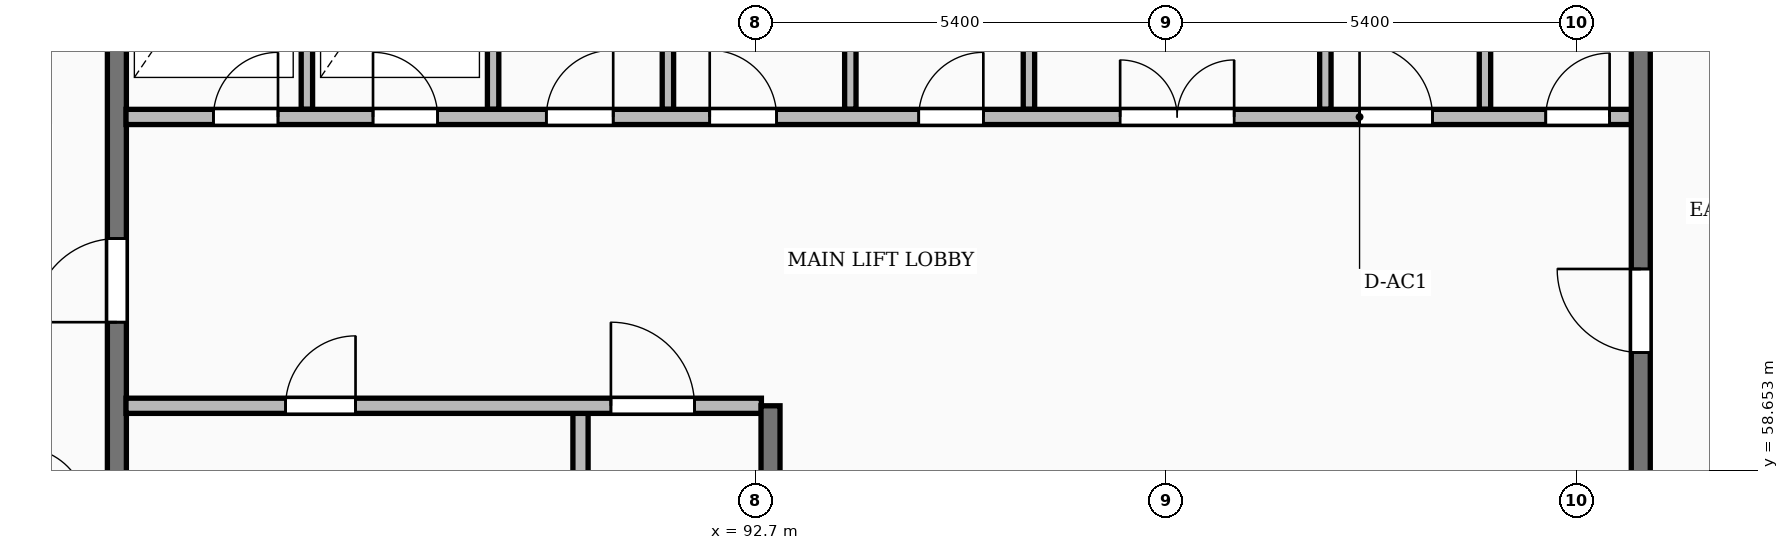
"""IFC4 building model, lengths in metres.
Left out: names, types, materials, properties, quantities, classifications, styles, units other than length and angle.
Written with IfcOpenShell. Run it as: python <this file> out.ifc"""

import sys

from ifc_helpers import new_model, si_unit, direction, frame, frame_2d, origin, place, context, subcontext, project, spatial, rectangle, extrude, element, fill, save


model = new_model("IFC4")
c1 = context("Model", 3, precision=1e-05, world=origin(), true_north=direction((0.0, 1.0)))
c2 = subcontext(c1, "Body", "Model", "MODEL_VIEW")
j1 = project(units=[si_unit("LENGTHUNIT", "METRE"), si_unit("PLANEANGLEUNIT", "RADIAN")], contexts=[c1])
p1 = place(None, origin())
s1 = spatial("IfcSite", under=j1, at=p1, CompositionType="ELEMENT")
p2 = place(p1, origin())
s2 = spatial("IfcBuilding", under=s1, at=p2, CompositionType="ELEMENT")
p3 = place(p2, frame((0.0, 0.0, 139.3)))
s3 = spatial("IfcBuildingStorey", under=s2, at=p3, CompositionType="ELEMENT", Elevation=139.3)
p4 = place(p3, frame((84.3, 55.4, 0.0), z_axis=(0.0, 0.0, 1.0), x_axis=(0.0, 1.0, 0.0)))
e1 = element("IfcWall", 1, at=p4, inside=s3, PredefinedType="SHEAR", context=c2, shape_type="SweptSolid", body=[
    extrude(rectangle(XDim=11.6, YDim=0.25, at=frame_2d((5.8, 0.0))), origin(), (0.0, 0.0, 1.0), 3.6),
])
p5 = place(p4, frame((5.2, 0.0, 0.0)))
e2 = element("IfcOpeningElement", 2, at=p5, cuts=e1, PredefinedType="OPENING", context=c2, shape_type="SweptSolid", body=[
    extrude(rectangle(XDim=1.1, YDim=2.1, at=frame_2d((0.55, 1.05))), frame((0.0, 0.135, 0.0), z_axis=(0.0, -1.0, 0.0), x_axis=(1.0, 0.0, 0.0)), (0.0, 0.0, 1.0), 0.27),
])
p6 = place(p3, frame((90.4, 55.4, 0.0), z_axis=(0.0, 0.0, 1.0), x_axis=(0.0, 1.0, 0.0)))
e3 = element("IfcWall", 3, at=p6, inside=s3, PredefinedType="PARTITIONING", context=c2, shape_type="SweptSolid", body=[
    extrude(rectangle(XDim=4.1, YDim=0.2, at=frame_2d((2.05, 0.0))), origin(), (0.0, 0.0, 1.0), 3.31),
])
p7 = place(p3, frame((84.42, 59.5, 0.0), z_axis=(0.0, 0.0, 1.0), x_axis=(1.0, 0.0, 0.0)))
e4 = element("IfcWall", 4, at=p7, inside=s3, PredefinedType="PARTITIONING", context=c2, shape_type="SweptSolid", body=[
    extrude(rectangle(XDim=8.36, YDim=0.2, at=frame_2d((4.18, 0.0))), origin(), (0.0, 0.0, 1.0), 3.31),
])
p8 = place(p7, frame((2.1, 0.0, 0.0)))
e5 = element("IfcOpeningElement", 5, at=p8, cuts=e4, PredefinedType="OPENING", context=c2, shape_type="SweptSolid", body=[
    extrude(rectangle(XDim=0.92, YDim=2.08, at=frame_2d((0.46, 1.04))), frame((0.0, 0.11, 0.0), z_axis=(0.0, -1.0, 0.0), x_axis=(1.0, 0.0, 0.0)), (0.0, 0.0, 1.0), 0.22),
])
p9 = place(p7, frame((6.38, 0.0, 0.0)))
e6 = element("IfcOpeningElement", 6, at=p9, cuts=e4, PredefinedType="OPENING", context=c2, shape_type="SweptSolid", body=[
    extrude(rectangle(XDim=1.1, YDim=2.1, at=frame_2d((0.55, 1.05))), frame((0.0, 0.11, 0.0), z_axis=(0.0, -1.0, 0.0), x_axis=(1.0, 0.0, 0.0)), (0.0, 0.0, 1.0), 0.22),
])
p10 = place(p3, frame((92.9, 55.4, 0.0), z_axis=(0.0, 0.0, 1.0), x_axis=(0.0, 1.0, 0.0)))
e7 = element("IfcWall", 7, at=p10, inside=s3, PredefinedType="SHEAR", context=c2, shape_type="SweptSolid", body=[
    extrude(rectangle(XDim=4.1, YDim=0.25, at=frame_2d((2.05, 0.0))), origin(), (0.0, 0.0, 1.0), 3.6),
])
for number, where, z_axis, x_axis in (
    (8, (86.8, 63.4, 0.0), (0.0, 0.0, 1.0), (0.0, 1.0, 0.0)),
    (9, (89.25, 63.4, 0.0), (0.0, 0.0, 1.0), (0.0, 1.0, 0.0)),
    (10, (91.55, 63.4, 0.0), (0.0, 0.0, 1.0), (0.0, 1.0, 0.0)),
):
    element("IfcWall", number, at=place(p3, frame(where, z_axis=z_axis, x_axis=x_axis)), inside=s3, PredefinedType="PARTITIONING", context=c2, shape_type="SweptSolid", body=[
        extrude(rectangle(XDim=3.6, YDim=0.15, at=frame_2d((1.8, 0.0))), origin(), (0.0, 0.0, 1.0), 3.31),
    ])
p11 = place(p3, frame((93.95, 63.4, 0.0), z_axis=(0.0, 0.0, 1.0), x_axis=(0.0, 1.0, 0.0)))
e11 = element("IfcWall", 11, at=p11, inside=s3, PredefinedType="PARTITIONING", context=c2, shape_type="SweptSolid", body=[
    extrude(rectangle(XDim=3.6, YDim=0.15, at=frame_2d((1.8, 0.0))), origin(), (0.0, 0.0, 1.0), 2.617),
])
for number, where, z_axis, x_axis in (
    (12, (102.3, 63.4, 0.0), (0.0, 0.0, 1.0), (0.0, 1.0, 0.0)),
    (13, (96.3, 63.4, 0.0), (0.0, 0.0, 1.0), (0.0, 1.0, 0.0)),
    (14, (100.2, 63.4, 0.0), (0.0, 0.0, 1.0), (0.0, 1.0, 0.0)),
):
    element("IfcWall", number, at=place(p3, frame(where, z_axis=z_axis, x_axis=x_axis)), inside=s3, PredefinedType="PARTITIONING", context=c2, shape_type="SweptSolid", body=[
        extrude(rectangle(XDim=3.6, YDim=0.15, at=frame_2d((1.8, 0.0))), origin(), (0.0, 0.0, 1.0), 3.31),
    ])
p12 = place(p3, frame((84.42, 63.3, 0.0), z_axis=(0.0, 0.0, 1.0), x_axis=(1.0, 0.0, 0.0)))
e15 = element("IfcWall", 15, at=p12, inside=s3, PredefinedType="PARTITIONING", context=c2, shape_type="SweptSolid", body=[
    extrude(rectangle(XDim=19.83, YDim=0.2, at=frame_2d((9.915, 0.0))), origin(), (0.0, 0.0, 1.0), 3.31),
])
p13 = place(p12, frame((1.15, 0.0, 0.0)))
e16 = element("IfcOpeningElement", 16, at=p13, cuts=e15, PredefinedType="OPENING", context=c2, shape_type="SweptSolid", body=[
    extrude(rectangle(XDim=0.85, YDim=2.05, at=frame_2d((0.425, 1.025))), frame((0.0, 0.11, 0.0), z_axis=(0.0, -1.0, 0.0), x_axis=(1.0, 0.0, 0.0)), (0.0, 0.0, 1.0), 0.22),
])
p14 = place(p12, frame((3.25, 0.0, 0.0)))
e17 = element("IfcOpeningElement", 17, at=p14, cuts=e15, PredefinedType="OPENING", context=c2, shape_type="SweptSolid", body=[
    extrude(rectangle(XDim=0.85, YDim=2.05, at=frame_2d((0.425, 1.025))), frame((0.0, 0.11, 0.0), z_axis=(0.0, -1.0, 0.0), x_axis=(1.0, 0.0, 0.0)), (0.0, 0.0, 1.0), 0.22),
])
p15 = place(p12, frame((13.08, 0.0, 0.0)))
e18 = element("IfcOpeningElement", 18, at=p15, cuts=e15, PredefinedType="OPENING", context=c2, shape_type="SweptSolid", body=[
    extrude(rectangle(XDim=1.5, YDim=2.2, at=frame_2d((0.75, 1.1))), frame((0.0, 0.11, 0.0), z_axis=(0.0, -1.0, 0.0), x_axis=(1.0, 0.0, 0.0)), (0.0, 0.0, 1.0), 0.22),
])
p16 = place(p12, frame((5.53, 0.0, 0.0)))
e19 = element("IfcOpeningElement", 19, at=p16, cuts=e15, PredefinedType="OPENING", context=c2, shape_type="SweptSolid", body=[
    extrude(rectangle(XDim=0.88, YDim=2.06, at=frame_2d((0.44, 1.03))), frame((0.0, 0.11, 0.0), z_axis=(0.0, -1.0, 0.0), x_axis=(1.0, 0.0, 0.0)), (0.0, 0.0, 1.0), 0.22),
])
p17 = place(p12, frame((7.68, 0.0, 0.0)))
e20 = element("IfcOpeningElement", 20, at=p17, cuts=e15, PredefinedType="OPENING", context=c2, shape_type="SweptSolid", body=[
    extrude(rectangle(XDim=0.88, YDim=2.06, at=frame_2d((0.44, 1.03))), frame((0.0, 0.11, 0.0), z_axis=(0.0, -1.0, 0.0), x_axis=(1.0, 0.0, 0.0)), (0.0, 0.0, 1.0), 0.22),
])
p18 = place(p12, frame((10.43, 0.0, 0.0)))
e21 = element("IfcOpeningElement", 21, at=p18, cuts=e15, PredefinedType="OPENING", context=c2, shape_type="SweptSolid", body=[
    extrude(rectangle(XDim=0.85, YDim=2.05, at=frame_2d((0.425, 1.025))), frame((0.0, 0.11, 0.0), z_axis=(0.0, -1.0, 0.0), x_axis=(1.0, 0.0, 0.0)), (0.0, 0.0, 1.0), 0.22),
])
p19 = place(p12, frame((16.23, 0.0, 0.0)))
e22 = element("IfcOpeningElement", 22, at=p19, cuts=e15, PredefinedType="OPENING", context=c2, shape_type="SweptSolid", body=[
    extrude(rectangle(XDim=0.96, YDim=2.1, at=frame_2d((0.48, 1.05))), frame((0.0, 0.11, 0.0), z_axis=(0.0, -1.0, 0.0), x_axis=(1.0, 0.0, 0.0)), (0.0, 0.0, 1.0), 0.22),
])
p20 = place(p12, frame((18.68, 0.0, 0.0)))
e23 = element("IfcOpeningElement", 23, at=p20, cuts=e15, PredefinedType="OPENING", context=c2, shape_type="SweptSolid", body=[
    extrude(rectangle(XDim=0.84, YDim=2.04, at=frame_2d((0.42, 1.02))), frame((0.0, 0.11, 0.0), z_axis=(0.0, -1.0, 0.0), x_axis=(1.0, 0.0, 0.0)), (0.0, 0.0, 1.0), 0.22),
])
p21 = place(p3, frame((104.35, 58.4, 0.0), z_axis=(0.0, 0.0, 1.0), x_axis=(0.0, 1.0, 0.0)))
e24 = element("IfcWall", 24, at=p21, inside=s3, PredefinedType="SHEAR", context=c2, shape_type="SweptSolid", body=[
    extrude(rectangle(XDim=8.6, YDim=0.25, at=frame_2d((4.3, 0.0))), origin(), (0.0, 0.0, 1.0), 3.6),
])
p22 = place(p21, frame((1.8, 0.0, 0.0)))
e25 = element("IfcOpeningElement", 25, at=p22, cuts=e24, PredefinedType="OPENING", context=c2, shape_type="SweptSolid", body=[
    extrude(rectangle(XDim=1.1, YDim=2.1, at=frame_2d((0.55, 1.05))), frame((0.0, 0.135, 0.0), z_axis=(0.0, -1.0, 0.0), x_axis=(1.0, 0.0, 0.0)), (0.0, 0.0, 1.0), 0.27),
])
p23 = place(p5, origin())
e26 = element("IfcDoor", 26, at=p23, inside=s3, OperationType="SINGLE_SWING_LEFT", PredefinedType="DOOR", context=c2, shape_type="SweptSolid", body=[
    extrude(rectangle(XDim=1.1, YDim=2.1, at=frame_2d((0.55, 1.05))), frame((0.0, 0.025, 0.0), z_axis=(0.0, -1.0, 0.0), x_axis=(1.0, 0.0, 0.0)), (0.0, 0.0, 1.0), 0.05),
])
fill(e2, e26)
p24 = place(p8, origin())
e27 = element("IfcDoor", 27, at=p24, inside=s3, OperationType="SINGLE_SWING_RIGHT", PredefinedType="DOOR", context=c2, shape_type="SweptSolid", body=[
    extrude(rectangle(XDim=0.92, YDim=2.08, at=frame_2d((0.46, 1.04))), frame((0.0, 0.025, 0.0), z_axis=(0.0, -1.0, 0.0), x_axis=(1.0, 0.0, 0.0)), (0.0, 0.0, 1.0), 0.05),
])
fill(e5, e27)
p25 = place(p9, origin())
e28 = element("IfcDoor", 28, at=p25, inside=s3, OperationType="SINGLE_SWING_LEFT", PredefinedType="DOOR", context=c2, shape_type="SweptSolid", body=[
    extrude(rectangle(XDim=1.1, YDim=2.1, at=frame_2d((0.55, 1.05))), frame((0.0, 0.025, 0.0), z_axis=(0.0, -1.0, 0.0), x_axis=(1.0, 0.0, 0.0)), (0.0, 0.0, 1.0), 0.05),
])
fill(e6, e28)
p26 = place(p13, origin())
e29 = element("IfcDoor", 29, at=p26, inside=s3, OperationType="SINGLE_SWING_RIGHT", PredefinedType="DOOR", context=c2, shape_type="SweptSolid", body=[
    extrude(rectangle(XDim=0.85, YDim=2.05, at=frame_2d((0.425, 1.025))), frame((0.0, 0.025, 0.0), z_axis=(0.0, -1.0, 0.0), x_axis=(1.0, 0.0, 0.0)), (0.0, 0.0, 1.0), 0.05),
])
fill(e16, e29)
p27 = place(p14, origin())
e30 = element("IfcDoor", 30, at=p27, inside=s3, OperationType="SINGLE_SWING_LEFT", PredefinedType="DOOR", context=c2, shape_type="SweptSolid", body=[
    extrude(rectangle(XDim=0.85, YDim=2.05, at=frame_2d((0.425, 1.025))), frame((0.0, 0.025, 0.0), z_axis=(0.0, -1.0, 0.0), x_axis=(1.0, 0.0, 0.0)), (0.0, 0.0, 1.0), 0.05),
])
fill(e17, e30)
p28 = place(p15, origin())
e31 = element("IfcDoor", 31, at=p28, inside=s3, OperationType="DOUBLE_DOOR_SINGLE_SWING", PredefinedType="DOOR", context=c2, shape_type="SweptSolid", body=[
    extrude(rectangle(XDim=1.5, YDim=2.2, at=frame_2d((0.75, 1.1))), frame((0.0, 0.025, 0.0), z_axis=(0.0, -1.0, 0.0), x_axis=(1.0, 0.0, 0.0)), (0.0, 0.0, 1.0), 0.05),
])
fill(e18, e31)
p29 = place(p16, origin())
e32 = element("IfcDoor", 32, at=p29, inside=s3, OperationType="SINGLE_SWING_RIGHT", PredefinedType="DOOR", context=c2, shape_type="SweptSolid", body=[
    extrude(rectangle(XDim=0.88, YDim=2.06, at=frame_2d((0.44, 1.03))), frame((0.0, 0.025, 0.0), z_axis=(0.0, -1.0, 0.0), x_axis=(1.0, 0.0, 0.0)), (0.0, 0.0, 1.0), 0.05),
])
fill(e19, e32)
p30 = place(p17, origin())
e33 = element("IfcDoor", 33, at=p30, inside=s3, OperationType="SINGLE_SWING_LEFT", PredefinedType="DOOR", context=c2, shape_type="SweptSolid", body=[
    extrude(rectangle(XDim=0.88, YDim=2.06, at=frame_2d((0.44, 1.03))), frame((0.0, 0.025, 0.0), z_axis=(0.0, -1.0, 0.0), x_axis=(1.0, 0.0, 0.0)), (0.0, 0.0, 1.0), 0.05),
])
fill(e20, e33)
p31 = place(p18, origin())
e34 = element("IfcDoor", 34, at=p31, inside=s3, OperationType="SINGLE_SWING_RIGHT", PredefinedType="DOOR", context=c2, shape_type="SweptSolid", body=[
    extrude(rectangle(XDim=0.85, YDim=2.05, at=frame_2d((0.425, 1.025))), frame((0.0, 0.025, 0.0), z_axis=(0.0, -1.0, 0.0), x_axis=(1.0, 0.0, 0.0)), (0.0, 0.0, 1.0), 0.05),
])
fill(e21, e34)
p32 = place(p19, origin())
e35 = element("IfcDoor", 35, at=p32, inside=s3, OperationType="SINGLE_SWING_LEFT", PredefinedType="DOOR", context=c2, shape_type="SweptSolid", body=[
    extrude(rectangle(XDim=0.96, YDim=2.1, at=frame_2d((0.48, 1.05))), frame((0.0, 0.025, 0.0), z_axis=(0.0, -1.0, 0.0), x_axis=(1.0, 0.0, 0.0)), (0.0, 0.0, 1.0), 0.05),
])
fill(e22, e35)
p33 = place(p20, origin())
e36 = element("IfcDoor", 36, at=p33, inside=s3, OperationType="SINGLE_SWING_RIGHT", PredefinedType="DOOR", context=c2, shape_type="SweptSolid", body=[
    extrude(rectangle(XDim=0.84, YDim=2.04, at=frame_2d((0.42, 1.02))), frame((0.0, 0.025, 0.0), z_axis=(0.0, -1.0, 0.0), x_axis=(1.0, 0.0, 0.0)), (0.0, 0.0, 1.0), 0.05),
])
fill(e23, e36)
p34 = place(p22, origin())
e37 = element("IfcDoor", 37, at=p34, inside=s3, OperationType="SINGLE_SWING_RIGHT", PredefinedType="DOOR", context=c2, shape_type="SweptSolid", body=[
    extrude(rectangle(XDim=1.1, YDim=2.1, at=frame_2d((0.55, 1.05))), frame((0.0, 0.025, 0.0), z_axis=(0.0, -1.0, 0.0), x_axis=(1.0, 0.0, 0.0)), (0.0, 0.0, 1.0), 0.05),
])
fill(e25, e37)
save(model, sys.argv[1])
